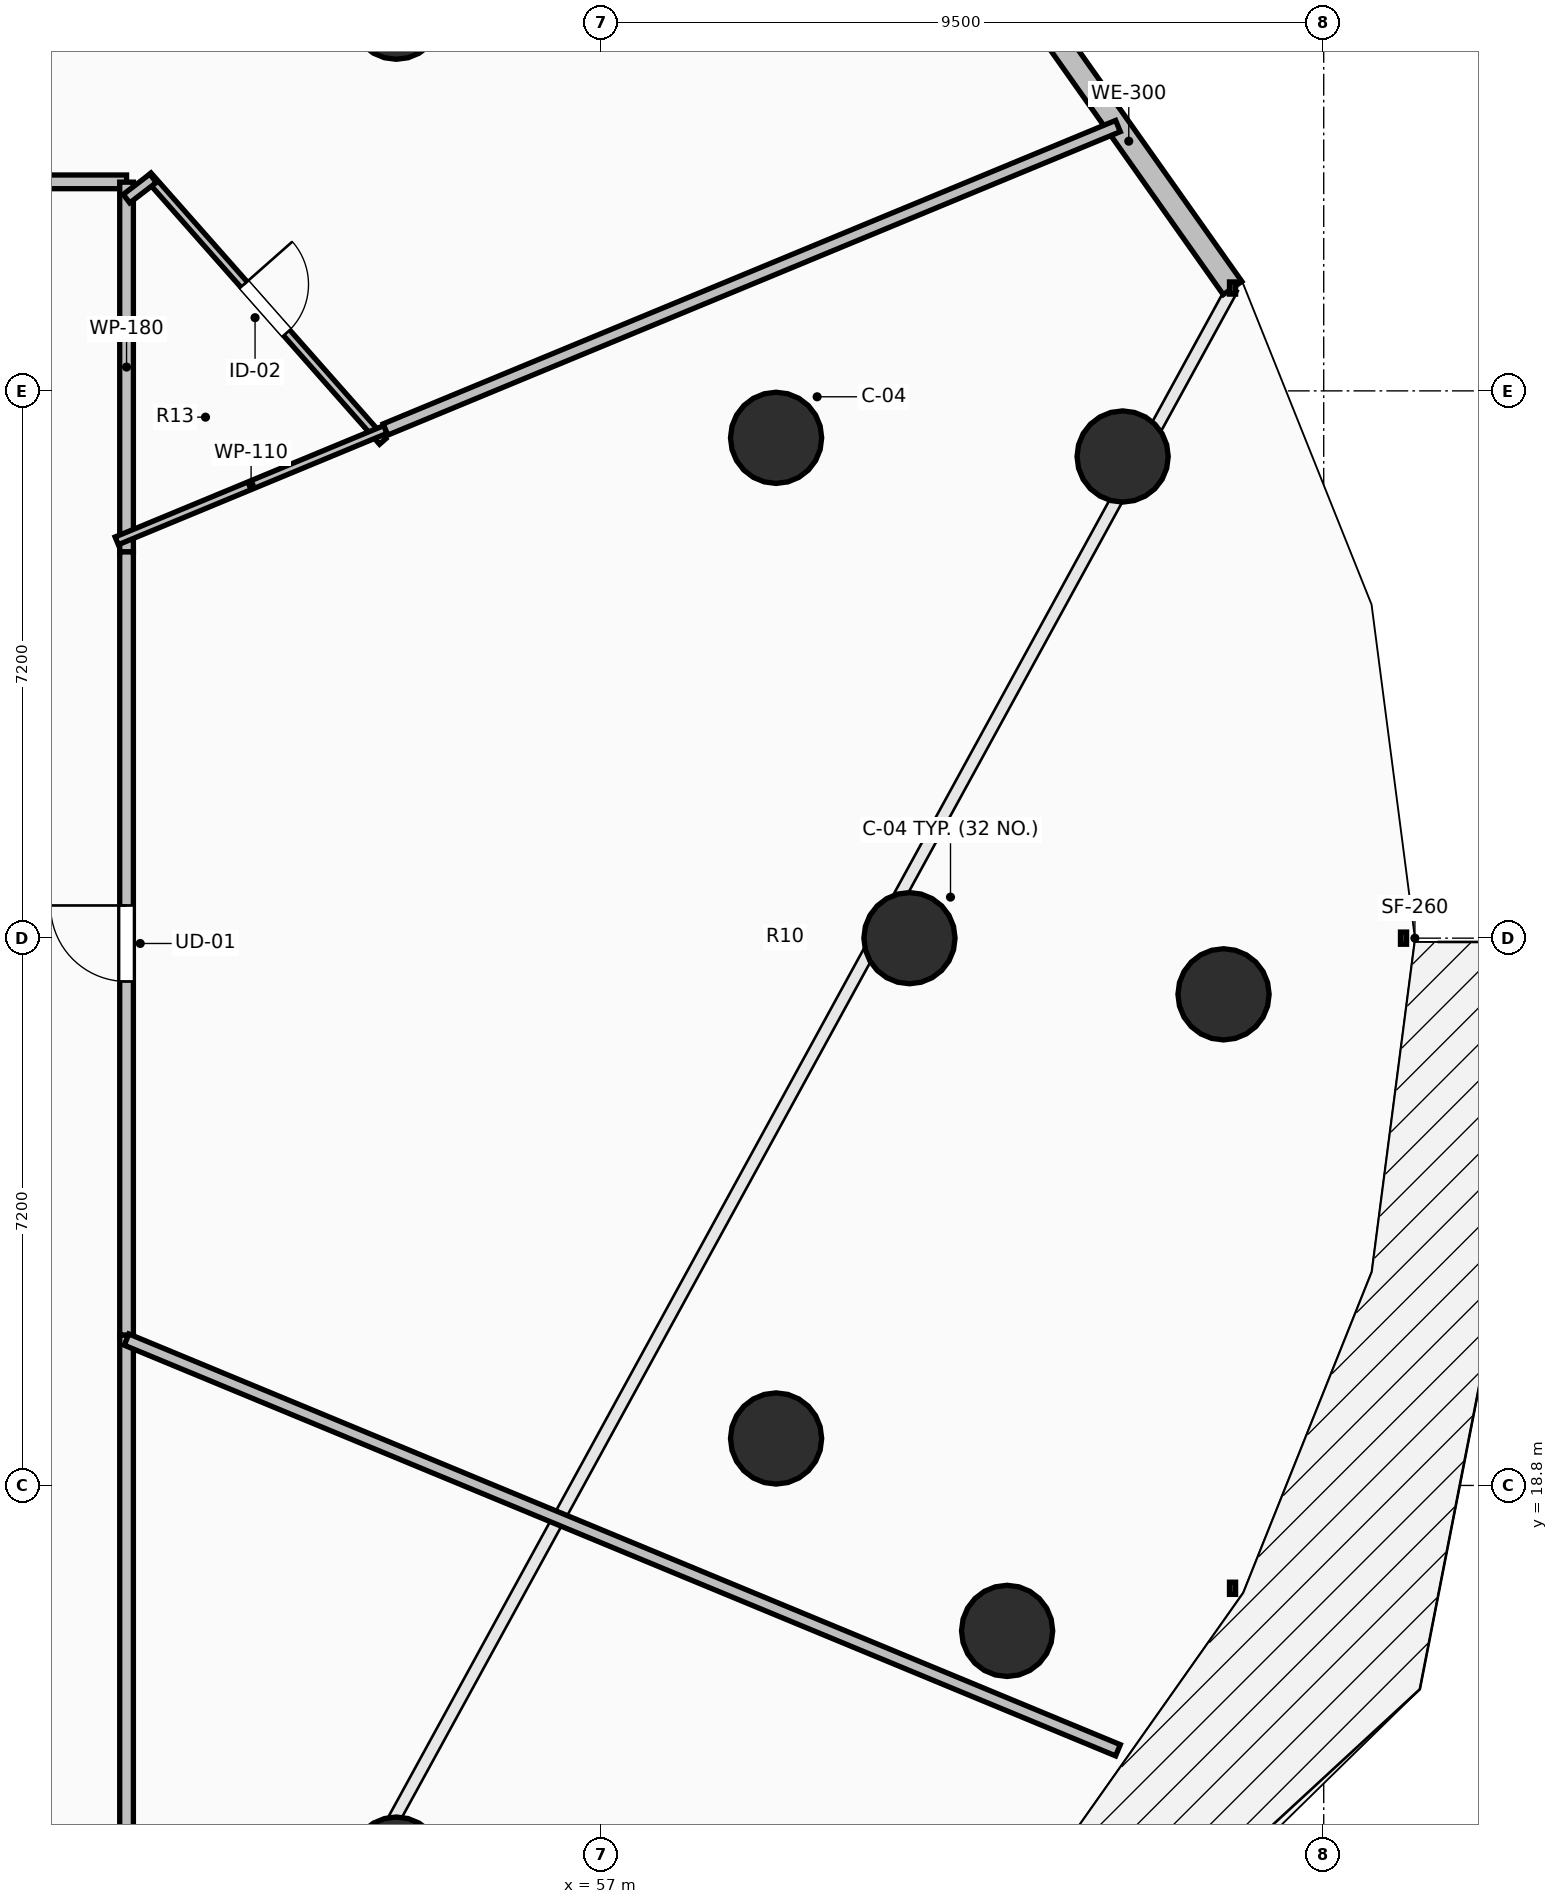
"""IFC4 building model, lengths in metres.
Left out: names, types, materials, properties, quantities, classifications, styles, units other than length and angle.
Written with IfcOpenShell. Run it as: python <this file> out.ifc"""

import sys

from ifc_helpers import new_model, si_unit, direction, frame, frame_2d, origin, origin_2d, place, context, subcontext, project, spatial, rectangle, circle, extrude, element, fill, save


model = new_model("IFC4")
c1 = context("Model", 3, precision=1e-05, world=origin(), true_north=direction((0.0, 1.0)))
c2 = subcontext(c1, "Body", "Model", "MODEL_VIEW")
j1 = project(units=[si_unit("LENGTHUNIT", "METRE"), si_unit("PLANEANGLEUNIT", "RADIAN")], contexts=[c1])
p1 = place(None, origin())
s1 = spatial("IfcSite", under=j1, at=p1, CompositionType="ELEMENT")
p2 = place(p1, origin())
s2 = spatial("IfcBuilding", under=s1, at=p2, CompositionType="ELEMENT")
p3 = place(p2, frame((0.0, 0.0, 52.0)))
s3 = spatial("IfcBuildingStorey", under=s2, at=p3, CompositionType="ELEMENT", Elevation=52.0)
for number, where, z_axis, x_axis in (
    (1, (61.05, 26.0, 0.0), (0.0, 0.0, 1.0), (1.0, 0.0, 0.0)),
    (2, (59.295, 32.582, 0.0), (0.0, 0.0, 1.0), (0.924, 0.383, 0.0)),
    (3, (54.299, 38.162, 0.0), (0.0, 0.0, 1.0), (0.707, 0.707, 0.0)),
    (4, (54.299, 13.838, 0.0), (0.0, 0.0, 1.0), (0.707, -0.707, 0.0)),
    (5, (59.295, 19.418, 0.0), (0.0, 0.0, 1.0), (0.924, -0.383, 0.0)),
    (6, (65.182, 25.261, 0.0), (0.0, 0.0, 1.0), (1.0, 0.0, 0.0)),
    (7, (63.854, 32.337, 0.0), (0.0, 0.0, 1.0), (0.924, 0.383, 0.0)),
    (8, (62.335, 16.886, 0.0), (0.0, 0.0, 1.0), (0.924, -0.383, 0.0)),
):
    element("IfcColumn", number, at=place(p3, frame(where, z_axis=z_axis, x_axis=x_axis)), inside=s3, PredefinedType="COLUMN", context=c2, shape_type="SweptSolid", body=[
        extrude(circle(Radius=0.6, at=origin_2d()), origin(), (0.0, 0.0, 1.0), 3.5),
    ])
p4 = place(p3, frame((65.301, 34.553, 0.0), z_axis=(0.0, 0.0, 1.0), x_axis=(-0.577130815624, 0.816651713803, 0.0)))
e9 = element("IfcWall", 9, at=p4, inside=s3, PredefinedType="STANDARD", context=c2, shape_type="SweptSolid", body=[
    extrude(rectangle(XDim=4.731, YDim=0.3, at=frame_2d((2.366, 0.0))), origin(), (0.0, 0.0, 1.0), 3.24),
])
p5 = place(p3, frame((50.75, 35.95, 0.0), z_axis=(0.0, 0.0, 1.0), x_axis=(-1.0, 0.0, 0.0)))
e10 = element("IfcWall", 10, at=p5, inside=s3, PredefinedType="PARTITIONING", context=c2, shape_type="SweptSolid", body=[
    extrude(rectangle(XDim=6.162, YDim=0.18, at=frame_2d((3.081, 0.0))), origin(), (0.0, 0.0, 1.0), 2.432),
])
p6 = place(p5, frame((2.556, 0.0, 0.0)))
e11 = element("IfcOpeningElement", 11, at=p6, cuts=e10, PredefinedType="OPENING", context=c2, shape_type="SweptSolid", body=[
    extrude(rectangle(XDim=1.05, YDim=2.2, at=frame_2d((0.525, 1.1))), frame((0.0, 0.105, 0.0), z_axis=(0.0, -1.0, 0.0), x_axis=(1.0, 0.0, 0.0)), (0.0, 0.0, 1.0), 0.21),
])
p7 = place(p3, frame((50.75, 31.081, 0.0), z_axis=(0.0, 0.0, 1.0), x_axis=(0.0, 1.0, 0.0)))
e12 = element("IfcWall", 12, at=p7, inside=s3, PredefinedType="PARTITIONING", context=c2, shape_type="SweptSolid", body=[
    extrude(rectangle(XDim=4.865, YDim=0.18, at=frame_2d((2.433, 0.0))), origin(), (0.0, 0.0, 1.0), 2.432),
])
p8 = place(p3, frame((50.75, 14.1, 0.0), z_axis=(0.0, 0.0, 1.0), x_axis=(0.0, 1.0, 0.0)))
e13 = element("IfcWall", 13, at=p8, inside=s3, PredefinedType="PARTITIONING", context=c2, shape_type="SweptSolid", body=[
    extrude(rectangle(XDim=6.679, YDim=0.18, at=frame_2d((3.339, 0.0))), origin(), (0.0, 0.0, 1.0), 2.432),
])
p9 = place(p3, frame((50.75, 20.779, 0.0), z_axis=(0.0, 0.0, 1.0), x_axis=(0.0, 1.0, 0.0)))
e14 = element("IfcWall", 14, at=p9, inside=s3, PredefinedType="PARTITIONING", context=c2, shape_type="SweptSolid", body=[
    extrude(rectangle(XDim=10.302, YDim=0.18, at=frame_2d((5.151, 0.0))), origin(), (0.0, 0.0, 1.0), 2.432),
])
p10 = place(p9, frame((4.651, 0.0, 0.0)))
e15 = element("IfcOpeningElement", 15, at=p10, cuts=e14, PredefinedType="OPENING", context=c2, shape_type="SweptSolid", body=[
    extrude(rectangle(XDim=1.0, YDim=2.15, at=frame_2d((0.5, 1.075))), frame((0.0, 0.105, 0.0), z_axis=(0.0, -1.0, 0.0), x_axis=(1.0, 0.0, 0.0)), (0.0, 0.0, 1.0), 0.21),
])
p11 = place(p3, frame((51.031, 36.03, 0.0), z_axis=(0.0, 0.0, 1.0), x_axis=(0.662106207726, -0.749410014405, 0.0)))
e16 = element("IfcWall", 16, at=p11, inside=s3, PredefinedType="PARTITIONING", context=c2, shape_type="SweptSolid", body=[
    extrude(rectangle(XDim=4.665, YDim=0.11, at=frame_2d((2.332, 0.0))), origin(), (0.0, 0.0, 1.0), 2.432),
])
p12 = place(p11, frame((1.907, 0.0, 0.0)))
e17 = element("IfcOpeningElement", 17, at=p12, cuts=e16, PredefinedType="OPENING", context=c2, shape_type="SweptSolid", body=[
    extrude(rectangle(XDim=0.85, YDim=2.1, at=frame_2d((0.425, 1.05))), frame((0.0, 0.07, 0.0), z_axis=(0.0, -1.0, 0.0), x_axis=(1.0, 0.0, 0.0)), (0.0, 0.0, 1.0), 0.14),
])
p13 = place(p3, frame((54.156, 32.693, 0.0), z_axis=(0.0, 0.0, 1.0), x_axis=(-0.923803754276, -0.382866326002, 0.0)))
e18 = element("IfcWall", 18, at=p13, inside=s3, PredefinedType="PARTITIONING", context=c2, shape_type="SweptSolid", body=[
    extrude(rectangle(XDim=3.827, YDim=0.11, at=frame_2d((1.914, 0.0))), origin(), (0.0, 0.0, 1.0), 2.432),
])
p14 = place(p3, frame((51.267, 45.856, 0.0), z_axis=(0.0, 0.0, 1.0), x_axis=(-0.55557946655, -0.831463442581, 0.0)))
e19 = element("IfcWall", 19, at=p14, inside=s3, PredefinedType="PARTITIONING", context=c2, shape_type="SweptSolid", body=[
    extrude(rectangle(XDim=11.914, YDim=0.16, at=frame_2d((5.957, 0.0))), origin(), (0.0, 0.0, 1.0), 2.432),
])
p15 = place(p3, frame((54.156, 32.692, 0.0), z_axis=(0.0, 0.0, 1.0), x_axis=(0.923866486063, 0.38271492776, 0.0)))
e20 = element("IfcWall", 20, at=p15, inside=s3, PredefinedType="PARTITIONING", context=c2, shape_type="SweptSolid", body=[
    extrude(rectangle(XDim=10.431, YDim=0.16, at=frame_2d((5.215, 0.0))), origin(), (0.0, 0.0, 1.0), 2.432),
])
p16 = place(p3, frame((63.793, 15.316, 0.0), z_axis=(0.0, 0.0, 1.0), x_axis=(-0.923866969846, 0.382713759914, 0.0)))
e21 = element("IfcWall", 21, at=p16, inside=s3, PredefinedType="PARTITIONING", context=c2, shape_type="SweptSolid", body=[
    extrude(rectangle(XDim=14.118, YDim=0.16, at=frame_2d((7.059, 0.0))), origin(), (0.0, 0.0, 1.0), 2.624),
])
p17 = place(p3, frame((51.099, 35.997, 0.0), z_axis=(0.0, 0.0, 1.0), x_axis=(-0.794185002189, -0.607676050456, 0.0)))
e22 = element("IfcWall", 22, at=p17, inside=s3, PredefinedType="PARTITIONING", context=c2, shape_type="SweptSolid", body=[
    extrude(rectangle(XDim=0.441, YDim=0.14, at=frame_2d((0.221, 0.0))), origin(), (0.0, 0.0, 1.0), 2.886),
])
p18 = place(p10, origin())
e23 = element("IfcDoor", 23, at=p18, inside=s3, OperationType="SINGLE_SWING_RIGHT", PredefinedType="DOOR", context=c2, shape_type="SweptSolid", body=[
    extrude(rectangle(XDim=1.0, YDim=2.15, at=frame_2d((0.5, 1.075))), frame((0.0, 0.025, 0.0), z_axis=(0.0, -1.0, 0.0), x_axis=(1.0, 0.0, 0.0)), (0.0, 0.0, 1.0), 0.05),
])
fill(e15, e23)
p19 = place(p12, origin())
e24 = element("IfcDoor", 24, at=p19, inside=s3, OperationType="SINGLE_SWING_LEFT", PredefinedType="DOOR", context=c2, shape_type="SweptSolid", body=[
    extrude(rectangle(XDim=0.85, YDim=2.1, at=frame_2d((0.425, 1.05))), frame((0.0, 0.025, 0.0), z_axis=(0.0, -1.0, 0.0), x_axis=(1.0, 0.0, 0.0)), (0.0, 0.0, 1.0), 0.05),
])
fill(e17, e24)
save(model, sys.argv[1])
